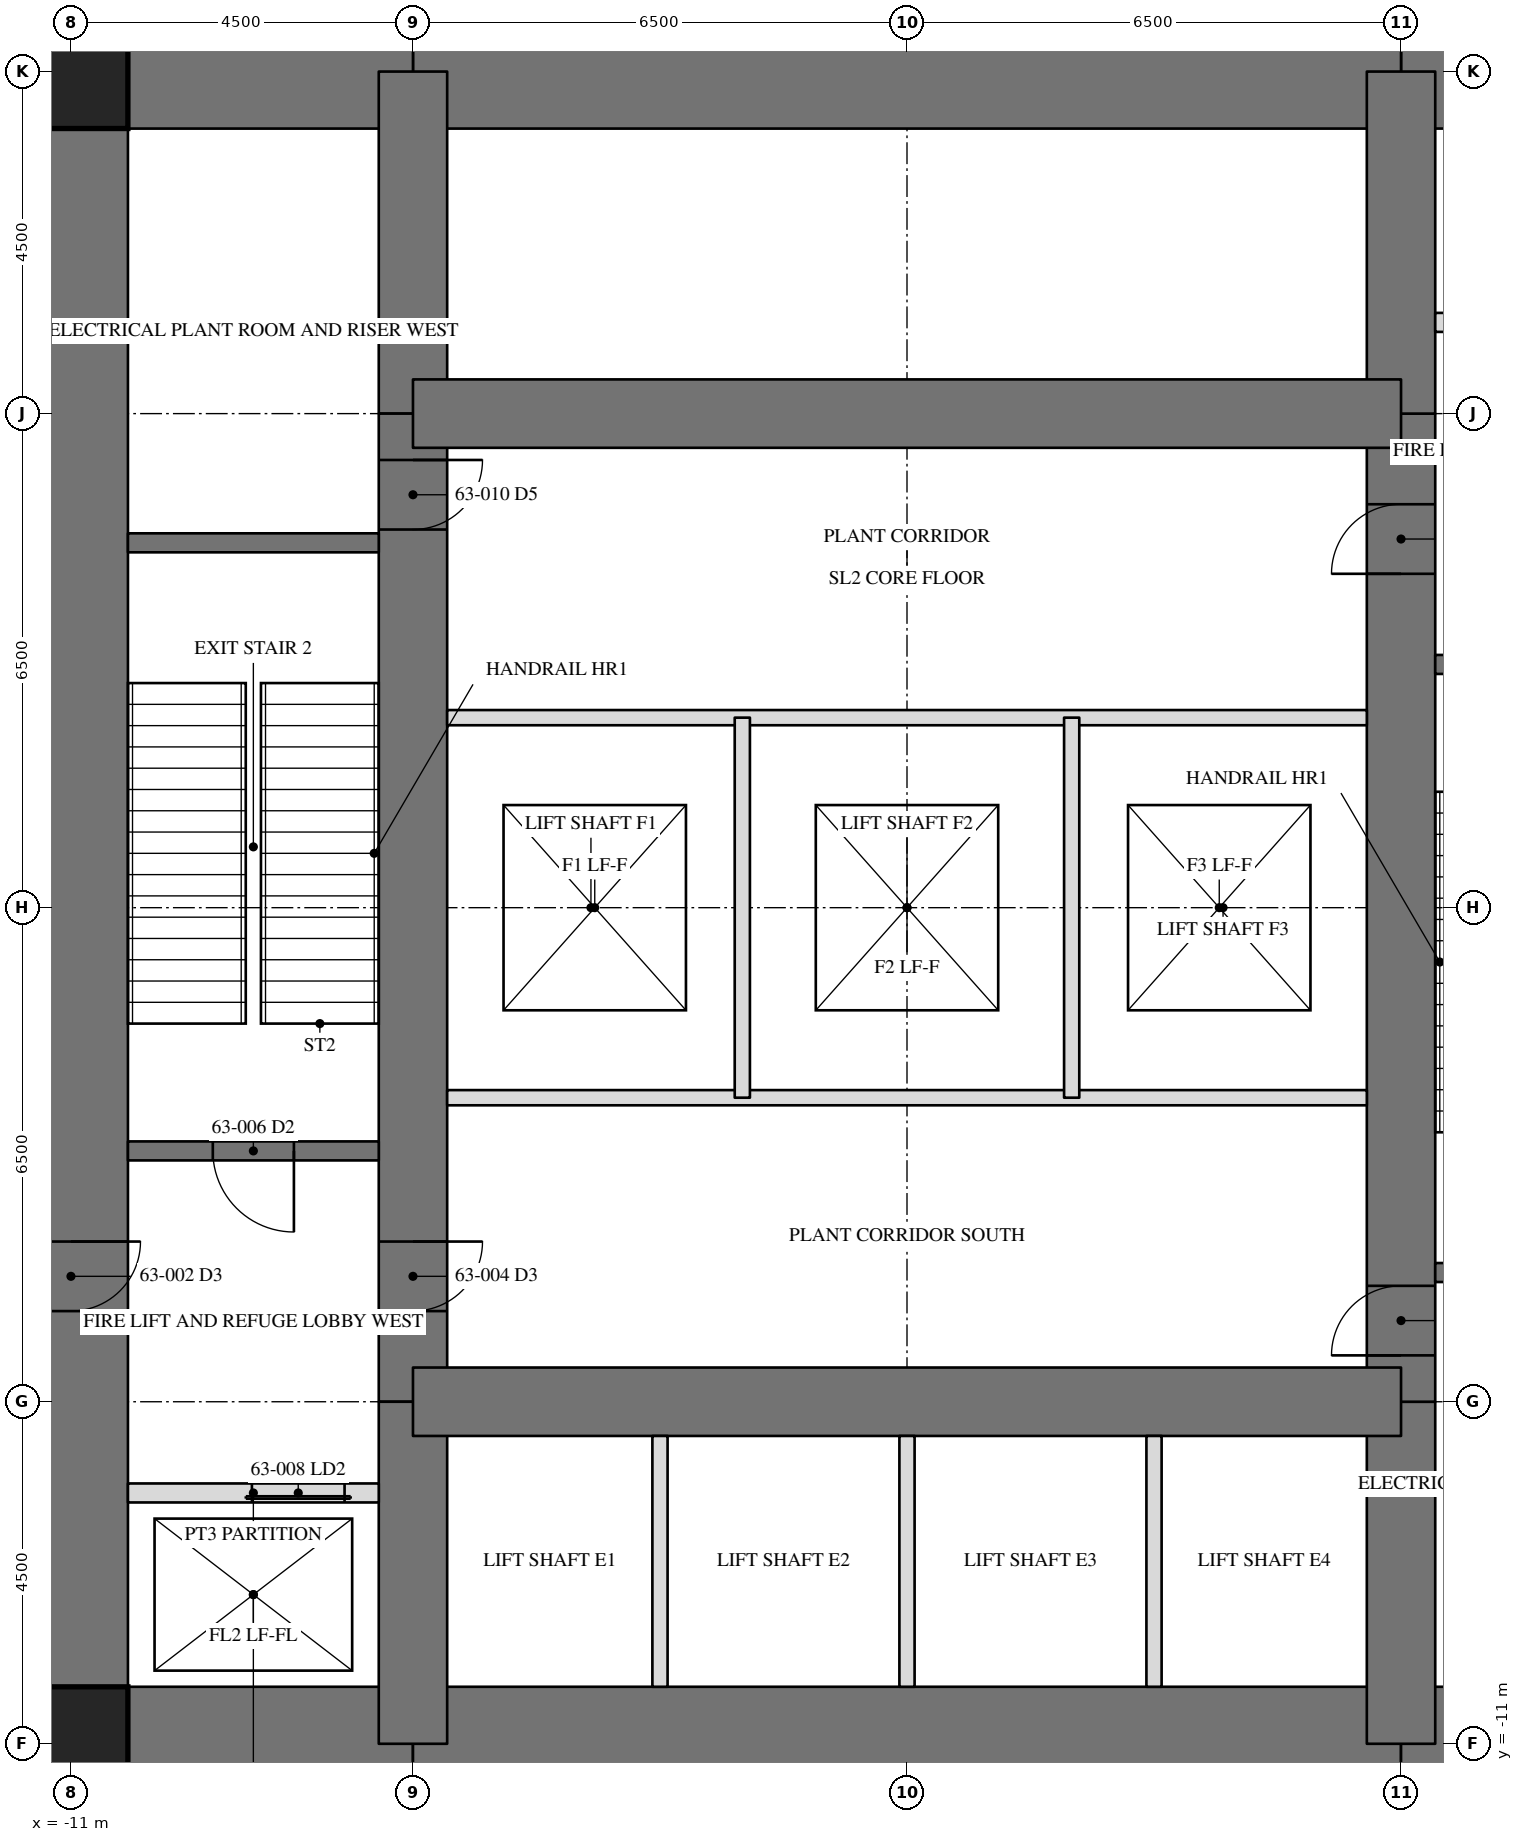
"""IFC4 building model, lengths in metres.
Left out: names, types, materials, properties, quantities, classifications, styles, units other than length and angle.
Written with IfcOpenShell. Run it as: python <this file> out.ifc"""

import sys

from ifc_helpers import new_model, si_unit, direction, frame, frame_2d, origin, origin_2d, place, context, subcontext, project, spatial, rectangle, hollow_rectangle, extrude, element, fill, save


model = new_model("IFC4")
c1 = context("Model", 3, precision=1e-05, world=origin(), true_north=direction((0.0, 1.0)))
c2 = subcontext(c1, "Body", "Model", "MODEL_VIEW")
j1 = project(units=[si_unit("LENGTHUNIT", "METRE"), si_unit("PLANEANGLEUNIT", "RADIAN")], contexts=[c1])
p1 = place(None, origin())
s1 = spatial("IfcSite", under=j1, at=p1, CompositionType="ELEMENT")
p2 = place(p1, origin())
s2 = spatial("IfcBuilding", under=s1, at=p2, CompositionType="ELEMENT")
p3 = place(p2, frame((0.0, 0.0, 257.2)))
s3 = spatial("IfcBuildingStorey", under=s2, at=p3, CompositionType="ELEMENT", Elevation=257.2)
p4 = place(p3, frame((-11.0, 11.0, 0.0), z_axis=(0.0, 0.0, 1.0), x_axis=(0.0, -1.0, 0.0)))
e1 = element("IfcWall", 1, at=p4, inside=s3, PredefinedType="SHEAR", context=c2, shape_type="SweptSolid", body=[
    extrude(rectangle(XDim=22.0, YDim=1.5, at=frame_2d((11.0, 0.0))), origin(), (0.0, 0.0, 1.0), 6.0),
])
p5 = place(p4, frame((15.393, 0.0, 0.0)))
e2 = element("IfcOpeningElement", 2, at=p5, cuts=e1, PredefinedType="OPENING", context=c2, shape_type="SweptSolid", body=[
    extrude(rectangle(XDim=0.915, YDim=2.134, at=frame_2d((0.458, 1.067))), frame((0.0, 0.76, 0.0), z_axis=(0.0, -1.0, 0.0), x_axis=(1.0, 0.0, 0.0)), (0.0, 0.0, 1.0), 1.52),
])
p6 = place(p3, frame((11.0, 11.0, 0.0), z_axis=(0.0, 0.0, 1.0), x_axis=(-1.0, 0.0, 0.0)))
e3 = element("IfcWall", 3, at=p6, inside=s3, PredefinedType="SHEAR", context=c2, shape_type="SweptSolid", body=[
    extrude(rectangle(XDim=4.5, YDim=1.5, at=frame_2d((2.25, 0.0))), origin(), (0.0, 0.0, 1.0), 6.0),
])
p7 = place(p3, frame((6.5, 11.0, 0.0), z_axis=(0.0, 0.0, 1.0), x_axis=(-1.0, 0.0, 0.0)))
e4 = element("IfcWall", 4, at=p7, inside=s3, PredefinedType="SHEAR", context=c2, shape_type="SweptSolid", body=[
    extrude(rectangle(XDim=13.0, YDim=1.5, at=frame_2d((6.5, 0.0))), origin(), (0.0, 0.0, 1.0), 6.0),
])
for number, where, z_axis, x_axis in (
    (5, (-6.5, 11.0, 0.0), (0.0, 0.0, 1.0), (-1.0, 0.0, 0.0)),
    (6, (-11.0, -11.0, 0.0), (0.0, 0.0, 1.0), (1.0, 0.0, 0.0)),
):
    element("IfcWall", number, at=place(p3, frame(where, z_axis=z_axis, x_axis=x_axis)), inside=s3, PredefinedType="SHEAR", context=c2, shape_type="SweptSolid", body=[
        extrude(rectangle(XDim=4.5, YDim=1.5, at=frame_2d((2.25, 0.0))), origin(), (0.0, 0.0, 1.0), 6.0),
    ])
p8 = place(p3, frame((-6.5, -11.0, 0.0), z_axis=(0.0, 0.0, 1.0), x_axis=(1.0, 0.0, 0.0)))
e7 = element("IfcWall", 7, at=p8, inside=s3, PredefinedType="SHEAR", context=c2, shape_type="SweptSolid", body=[
    extrude(rectangle(XDim=13.0, YDim=1.5, at=frame_2d((6.5, 0.0))), origin(), (0.0, 0.0, 1.0), 6.0),
])
p9 = place(p3, frame((6.5, -11.0, 0.0), z_axis=(0.0, 0.0, 1.0), x_axis=(1.0, 0.0, 0.0)))
e8 = element("IfcWall", 8, at=p9, inside=s3, PredefinedType="SHEAR", context=c2, shape_type="SweptSolid", body=[
    extrude(rectangle(XDim=4.5, YDim=1.5, at=frame_2d((2.25, 0.0))), origin(), (0.0, 0.0, 1.0), 6.0),
])
p10 = place(p3, frame((6.5, -11.0, 0.0), z_axis=(0.0, 0.0, 1.0), x_axis=(0.0, 1.0, 0.0)))
e9 = element("IfcWall", 9, at=p10, inside=s3, PredefinedType="SHEAR", context=c2, shape_type="SweptSolid", body=[
    extrude(rectangle(XDim=4.5, YDim=0.9, at=frame_2d((2.25, 0.0))), origin(), (0.0, 0.0, 1.0), 6.0),
])
p11 = place(p3, frame((6.5, -6.5, 0.0), z_axis=(0.0, 0.0, 1.0), x_axis=(0.0, 1.0, 0.0)))
e10 = element("IfcWall", 10, at=p11, inside=s3, PredefinedType="SHEAR", context=c2, shape_type="SweptSolid", body=[
    extrude(rectangle(XDim=13.0, YDim=0.9, at=frame_2d((6.5, 0.0))), origin(), (0.0, 0.0, 1.0), 6.0),
])
p12 = place(p11, frame((10.893, 0.0, 0.0)))
e11 = element("IfcOpeningElement", 11, at=p12, cuts=e10, PredefinedType="OPENING", context=c2, shape_type="SweptSolid", body=[
    extrude(rectangle(XDim=0.915, YDim=2.134, at=frame_2d((0.458, 1.067))), frame((0.0, 0.46, 0.0), z_axis=(0.0, -1.0, 0.0), x_axis=(1.0, 0.0, 0.0)), (0.0, 0.0, 1.0), 0.92),
])
p13 = place(p11, frame((0.61, 0.0, 0.0)))
e12 = element("IfcOpeningElement", 12, at=p13, cuts=e10, PredefinedType="OPENING", context=c2, shape_type="SweptSolid", body=[
    extrude(rectangle(XDim=0.915, YDim=2.134, at=frame_2d((0.458, 1.067))), frame((0.0, 0.46, 0.0), z_axis=(0.0, -1.0, 0.0), x_axis=(1.0, 0.0, 0.0)), (0.0, 0.0, 1.0), 0.92),
])
for number, where, z_axis, x_axis in (
    (13, (6.5, 6.5, 0.0), (0.0, 0.0, 1.0), (0.0, 1.0, 0.0)),
    (14, (-6.5, 11.0, 0.0), (0.0, 0.0, 1.0), (0.0, -1.0, 0.0)),
):
    element("IfcWall", number, at=place(p3, frame(where, z_axis=z_axis, x_axis=x_axis)), inside=s3, PredefinedType="SHEAR", context=c2, shape_type="SweptSolid", body=[
        extrude(rectangle(XDim=4.5, YDim=0.9, at=frame_2d((2.25, 0.0))), origin(), (0.0, 0.0, 1.0), 6.0),
    ])
p14 = place(p3, frame((-6.5, 6.5, 0.0), z_axis=(0.0, 0.0, 1.0), x_axis=(0.0, -1.0, 0.0)))
e15 = element("IfcWall", 15, at=p14, inside=s3, PredefinedType="SHEAR", context=c2, shape_type="SweptSolid", body=[
    extrude(rectangle(XDim=13.0, YDim=0.9, at=frame_2d((6.5, 0.0))), origin(), (0.0, 0.0, 1.0), 6.0),
])
p15 = place(p14, frame((10.893, 0.0, 0.0)))
e16 = element("IfcOpeningElement", 16, at=p15, cuts=e15, PredefinedType="OPENING", context=c2, shape_type="SweptSolid", body=[
    extrude(rectangle(XDim=0.915, YDim=2.134, at=frame_2d((0.458, 1.067))), frame((0.0, 0.46, 0.0), z_axis=(0.0, -1.0, 0.0), x_axis=(1.0, 0.0, 0.0)), (0.0, 0.0, 1.0), 0.92),
])
p16 = place(p14, frame((0.61, 0.0, 0.0)))
e17 = element("IfcOpeningElement", 17, at=p16, cuts=e15, PredefinedType="OPENING", context=c2, shape_type="SweptSolid", body=[
    extrude(rectangle(XDim=0.915, YDim=2.134, at=frame_2d((0.458, 1.067))), frame((0.0, 0.46, 0.0), z_axis=(0.0, -1.0, 0.0), x_axis=(1.0, 0.0, 0.0)), (0.0, 0.0, 1.0), 0.92),
])
p17 = place(p3, frame((-6.5, -6.5, 0.0), z_axis=(0.0, 0.0, 1.0), x_axis=(0.0, -1.0, 0.0)))
e18 = element("IfcWall", 18, at=p17, inside=s3, PredefinedType="SHEAR", context=c2, shape_type="SweptSolid", body=[
    extrude(rectangle(XDim=4.5, YDim=0.9, at=frame_2d((2.25, 0.0))), origin(), (0.0, 0.0, 1.0), 6.0),
])
for number, where, z_axis, x_axis in (
    (19, (6.5, 6.5, 0.0), (0.0, 0.0, 1.0), (-1.0, 0.0, 0.0)),
    (20, (-6.5, -6.5, 0.0), (0.0, 0.0, 1.0), (1.0, 0.0, 0.0)),
):
    element("IfcWall", number, at=place(p3, frame(where, z_axis=z_axis, x_axis=x_axis)), inside=s3, PredefinedType="SHEAR", context=c2, shape_type="SweptSolid", body=[
        extrude(rectangle(XDim=13.0, YDim=0.9, at=frame_2d((6.5, 0.0))), origin(), (0.0, 0.0, 1.0), 6.0),
    ])
for number, where, z_axis, x_axis in (
    (21, (-11.0, 11.0, 0.0), (0.0, 0.0, 1.0), (1.0, 0.0, 0.0)),
    (22, (-11.0, -11.0, 0.0), (0.0, 0.0, 1.0), (1.0, 0.0, 0.0)),
):
    element("IfcColumn", number, at=place(p3, frame(where, z_axis=z_axis, x_axis=x_axis)), inside=s3, PredefinedType="COLUMN", context=c2, shape_type="SweptSolid", body=[
        extrude(hollow_rectangle(XDim=1.499, YDim=1.499, WallThickness=0.102, at=origin_2d()), origin(), (0.0, 0.0, 1.0), 6.0),
    ])
for number, where, z_axis, x_axis in (
    (23, (6.95, -4.8, 0.0), (0.0, 0.0, 1.0), (1.0, 0.0, 0.0)),
    (24, (-6.95, 4.8, 0.0), (0.0, 0.0, 1.0), (-1.0, 0.0, 0.0)),
):
    element("IfcWall", number, at=place(p3, frame(where, z_axis=z_axis, x_axis=x_axis)), inside=s3, PredefinedType="SOLIDWALL", context=c2, shape_type="SweptSolid", body=[
        extrude(rectangle(XDim=3.3, YDim=0.25, at=frame_2d((1.65, 0.0))), origin(), (0.0, 0.0, 1.0), 5.81),
    ])
p18 = place(p3, frame((6.95, 3.2, 0.0), z_axis=(0.0, 0.0, 1.0), x_axis=(1.0, 0.0, 0.0)))
e25 = element("IfcWall", 25, at=p18, inside=s3, PredefinedType="SOLIDWALL", context=c2, shape_type="SweptSolid", body=[
    extrude(rectangle(XDim=3.3, YDim=0.25, at=frame_2d((1.65, 0.0))), origin(), (0.0, 0.0, 1.0), 5.81),
])
p19 = place(p18, frame((1.116, 0.0, 0.0)))
e26 = element("IfcOpeningElement", 26, at=p19, cuts=e25, PredefinedType="OPENING", context=c2, shape_type="SweptSolid", body=[
    extrude(rectangle(XDim=1.067, YDim=2.134, at=frame_2d((0.533, 1.067))), frame((0.0, 0.135, 0.0), z_axis=(0.0, -1.0, 0.0), x_axis=(1.0, 0.0, 0.0)), (0.0, 0.0, 1.0), 0.27),
])
p20 = place(p3, frame((-6.95, -3.2, 0.0), z_axis=(0.0, 0.0, 1.0), x_axis=(-1.0, 0.0, 0.0)))
e27 = element("IfcWall", 27, at=p20, inside=s3, PredefinedType="SOLIDWALL", context=c2, shape_type="SweptSolid", body=[
    extrude(rectangle(XDim=3.3, YDim=0.25, at=frame_2d((1.65, 0.0))), origin(), (0.0, 0.0, 1.0), 5.81),
])
p21 = place(p20, frame((1.116, 0.0, 0.0)))
e28 = element("IfcOpeningElement", 28, at=p21, cuts=e27, PredefinedType="OPENING", context=c2, shape_type="SweptSolid", body=[
    extrude(rectangle(XDim=1.067, YDim=2.134, at=frame_2d((0.533, 1.067))), frame((0.0, 0.135, 0.0), z_axis=(0.0, -1.0, 0.0), x_axis=(1.0, 0.0, 0.0)), (0.0, 0.0, 1.0), 0.27),
])
p22 = place(p3, frame((6.95, 7.7, 0.0), z_axis=(0.0, 0.0, 1.0), x_axis=(1.0, 0.0, 0.0)))
e29 = element("IfcWall", 29, at=p22, inside=s3, PredefinedType="PARTITIONING", context=c2, shape_type="SweptSolid", body=[
    extrude(rectangle(XDim=3.3, YDim=0.25, at=frame_2d((1.65, 0.0))), origin(), (0.0, 0.0, 1.0), 5.81),
])
p23 = place(p22, frame((0.45, 0.0, 0.0)))
e30 = element("IfcOpeningElement", 30, at=p23, cuts=e29, PredefinedType="OPENING", context=c2, shape_type="SweptSolid", body=[
    extrude(rectangle(XDim=1.219, YDim=2.134, at=frame_2d((0.609, 1.067))), frame((0.0, 0.135, 0.0), z_axis=(0.0, -1.0, 0.0), x_axis=(1.0, 0.0, 0.0)), (0.0, 0.0, 1.0), 0.27),
])
p24 = place(p3, frame((-6.95, -7.7, 0.0), z_axis=(0.0, 0.0, 1.0), x_axis=(-1.0, 0.0, 0.0)))
e31 = element("IfcWall", 31, at=p24, inside=s3, PredefinedType="PARTITIONING", context=c2, shape_type="SweptSolid", body=[
    extrude(rectangle(XDim=3.3, YDim=0.25, at=frame_2d((1.65, 0.0))), origin(), (0.0, 0.0, 1.0), 5.81),
])
p25 = place(p24, frame((0.45, 0.0, 0.0)))
e32 = element("IfcOpeningElement", 32, at=p25, cuts=e31, PredefinedType="OPENING", context=c2, shape_type="SweptSolid", body=[
    extrude(rectangle(XDim=1.219, YDim=2.134, at=frame_2d((0.609, 1.067))), frame((0.0, 0.135, 0.0), z_axis=(0.0, -1.0, 0.0), x_axis=(1.0, 0.0, 0.0)), (0.0, 0.0, 1.0), 0.27),
])
for number, where, z_axis, x_axis in (
    (33, (-6.05, 2.5, 0.0), (0.0, 0.0, 1.0), (1.0, 0.0, 0.0)),
    (34, (6.05, -2.5, 0.0), (0.0, 0.0, 1.0), (-1.0, 0.0, 0.0)),
):
    element("IfcWall", number, at=place(p3, frame(where, z_axis=z_axis, x_axis=x_axis)), inside=s3, PredefinedType="PARTITIONING", context=c2, shape_type="SweptSolid", body=[
        extrude(rectangle(XDim=12.1, YDim=0.2, at=frame_2d((6.05, 0.0))), origin(), (0.0, 0.0, 1.0), 5.81),
    ])
for number, where, z_axis, x_axis in (
    (35, (-3.25, -10.25, 0.0), (0.0, 0.0, 1.0), (0.0, 1.0, 0.0)),
    (36, (0.0, -10.25, 0.0), (0.0, 0.0, 1.0), (0.0, 1.0, 0.0)),
    (37, (3.25, -10.25, 0.0), (0.0, 0.0, 1.0), (0.0, 1.0, 0.0)),
):
    element("IfcWall", number, at=place(p3, frame(where, z_axis=z_axis, x_axis=x_axis)), inside=s3, PredefinedType="PARTITIONING", context=c2, shape_type="SweptSolid", body=[
        extrude(rectangle(XDim=3.3, YDim=0.2, at=frame_2d((1.65, 0.0))), origin(), (0.0, 0.0, 1.0), 5.81),
    ])
for number, where, z_axis, x_axis in (
    (38, (-2.167, -2.5, 0.0), (0.0, 0.0, 1.0), (0.0, 1.0, 0.0)),
    (39, (2.167, -2.5, 0.0), (0.0, 0.0, 1.0), (0.0, 1.0, 0.0)),
):
    element("IfcWall", number, at=place(p3, frame(where, z_axis=z_axis, x_axis=x_axis)), inside=s3, PredefinedType="PARTITIONING", context=c2, shape_type="SweptSolid", body=[
        extrude(rectangle(XDim=5.0, YDim=0.2, at=frame_2d((2.5, 0.0))), origin(), (0.0, 0.0, 1.0), 5.81),
    ])
p26 = place(p12, origin())
e40 = element("IfcDoor", 40, at=p26, inside=s3, OperationType="SINGLE_SWING_RIGHT", PredefinedType="DOOR", context=c2, shape_type="SweptSolid", body=[
    extrude(rectangle(XDim=0.915, YDim=2.134, at=frame_2d((0.458, 1.067))), frame((0.0, -0.375, 0.0), z_axis=(0.0, -1.0, 0.0), x_axis=(1.0, 0.0, 0.0)), (0.0, 0.0, 1.0), 0.05),
])
fill(e11, e40)
p27 = place(p15, origin())
e41 = element("IfcDoor", 41, at=p27, inside=s3, OperationType="SINGLE_SWING_RIGHT", PredefinedType="DOOR", context=c2, shape_type="SweptSolid", body=[
    extrude(rectangle(XDim=0.915, YDim=2.134, at=frame_2d((0.458, 1.067))), frame((0.0, -0.375, 0.0), z_axis=(0.0, -1.0, 0.0), x_axis=(1.0, 0.0, 0.0)), (0.0, 0.0, 1.0), 0.05),
])
fill(e16, e41)
p28 = place(p21, origin())
e42 = element("IfcDoor", 42, at=p28, inside=s3, OperationType="SINGLE_SWING_LEFT", PredefinedType="DOOR", context=c2, shape_type="SweptSolid", body=[
    extrude(rectangle(XDim=1.067, YDim=2.134, at=frame_2d((0.533, 1.067))), frame((0.0, 0.025, 0.0), z_axis=(0.0, -1.0, 0.0), x_axis=(1.0, 0.0, 0.0)), (0.0, 0.0, 1.0), 0.05),
])
fill(e28, e42)
p29 = place(p25, origin())
e43 = element("IfcDoor", 43, at=p29, inside=s3, OperationType="SLIDING_TO_LEFT", PredefinedType="DOOR", context=c2, shape_type="SweptSolid", body=[
    extrude(rectangle(XDim=1.219, YDim=2.134, at=frame_2d((0.609, 1.067))), frame((0.0, 0.025, 0.0), z_axis=(0.0, -1.0, 0.0), x_axis=(1.0, 0.0, 0.0)), (0.0, 0.0, 1.0), 0.05),
])
fill(e32, e43)
p30 = place(p13, origin())
e44 = element("IfcDoor", 44, at=p30, inside=s3, OperationType="SINGLE_SWING_RIGHT", PredefinedType="DOOR", context=c2, shape_type="SweptSolid", body=[
    extrude(rectangle(XDim=0.915, YDim=2.134, at=frame_2d((0.458, 1.067))), frame((0.0, -0.375, 0.0), z_axis=(0.0, -1.0, 0.0), x_axis=(1.0, 0.0, 0.0)), (0.0, 0.0, 1.0), 0.05),
])
fill(e12, e44)
p31 = place(p16, origin())
e45 = element("IfcDoor", 45, at=p31, inside=s3, OperationType="SINGLE_SWING_RIGHT", PredefinedType="DOOR", context=c2, shape_type="SweptSolid", body=[
    extrude(rectangle(XDim=0.915, YDim=2.134, at=frame_2d((0.458, 1.067))), frame((0.0, -0.375, 0.0), z_axis=(0.0, -1.0, 0.0), x_axis=(1.0, 0.0, 0.0)), (0.0, 0.0, 1.0), 0.05),
])
fill(e17, e45)
save(model, sys.argv[1])
